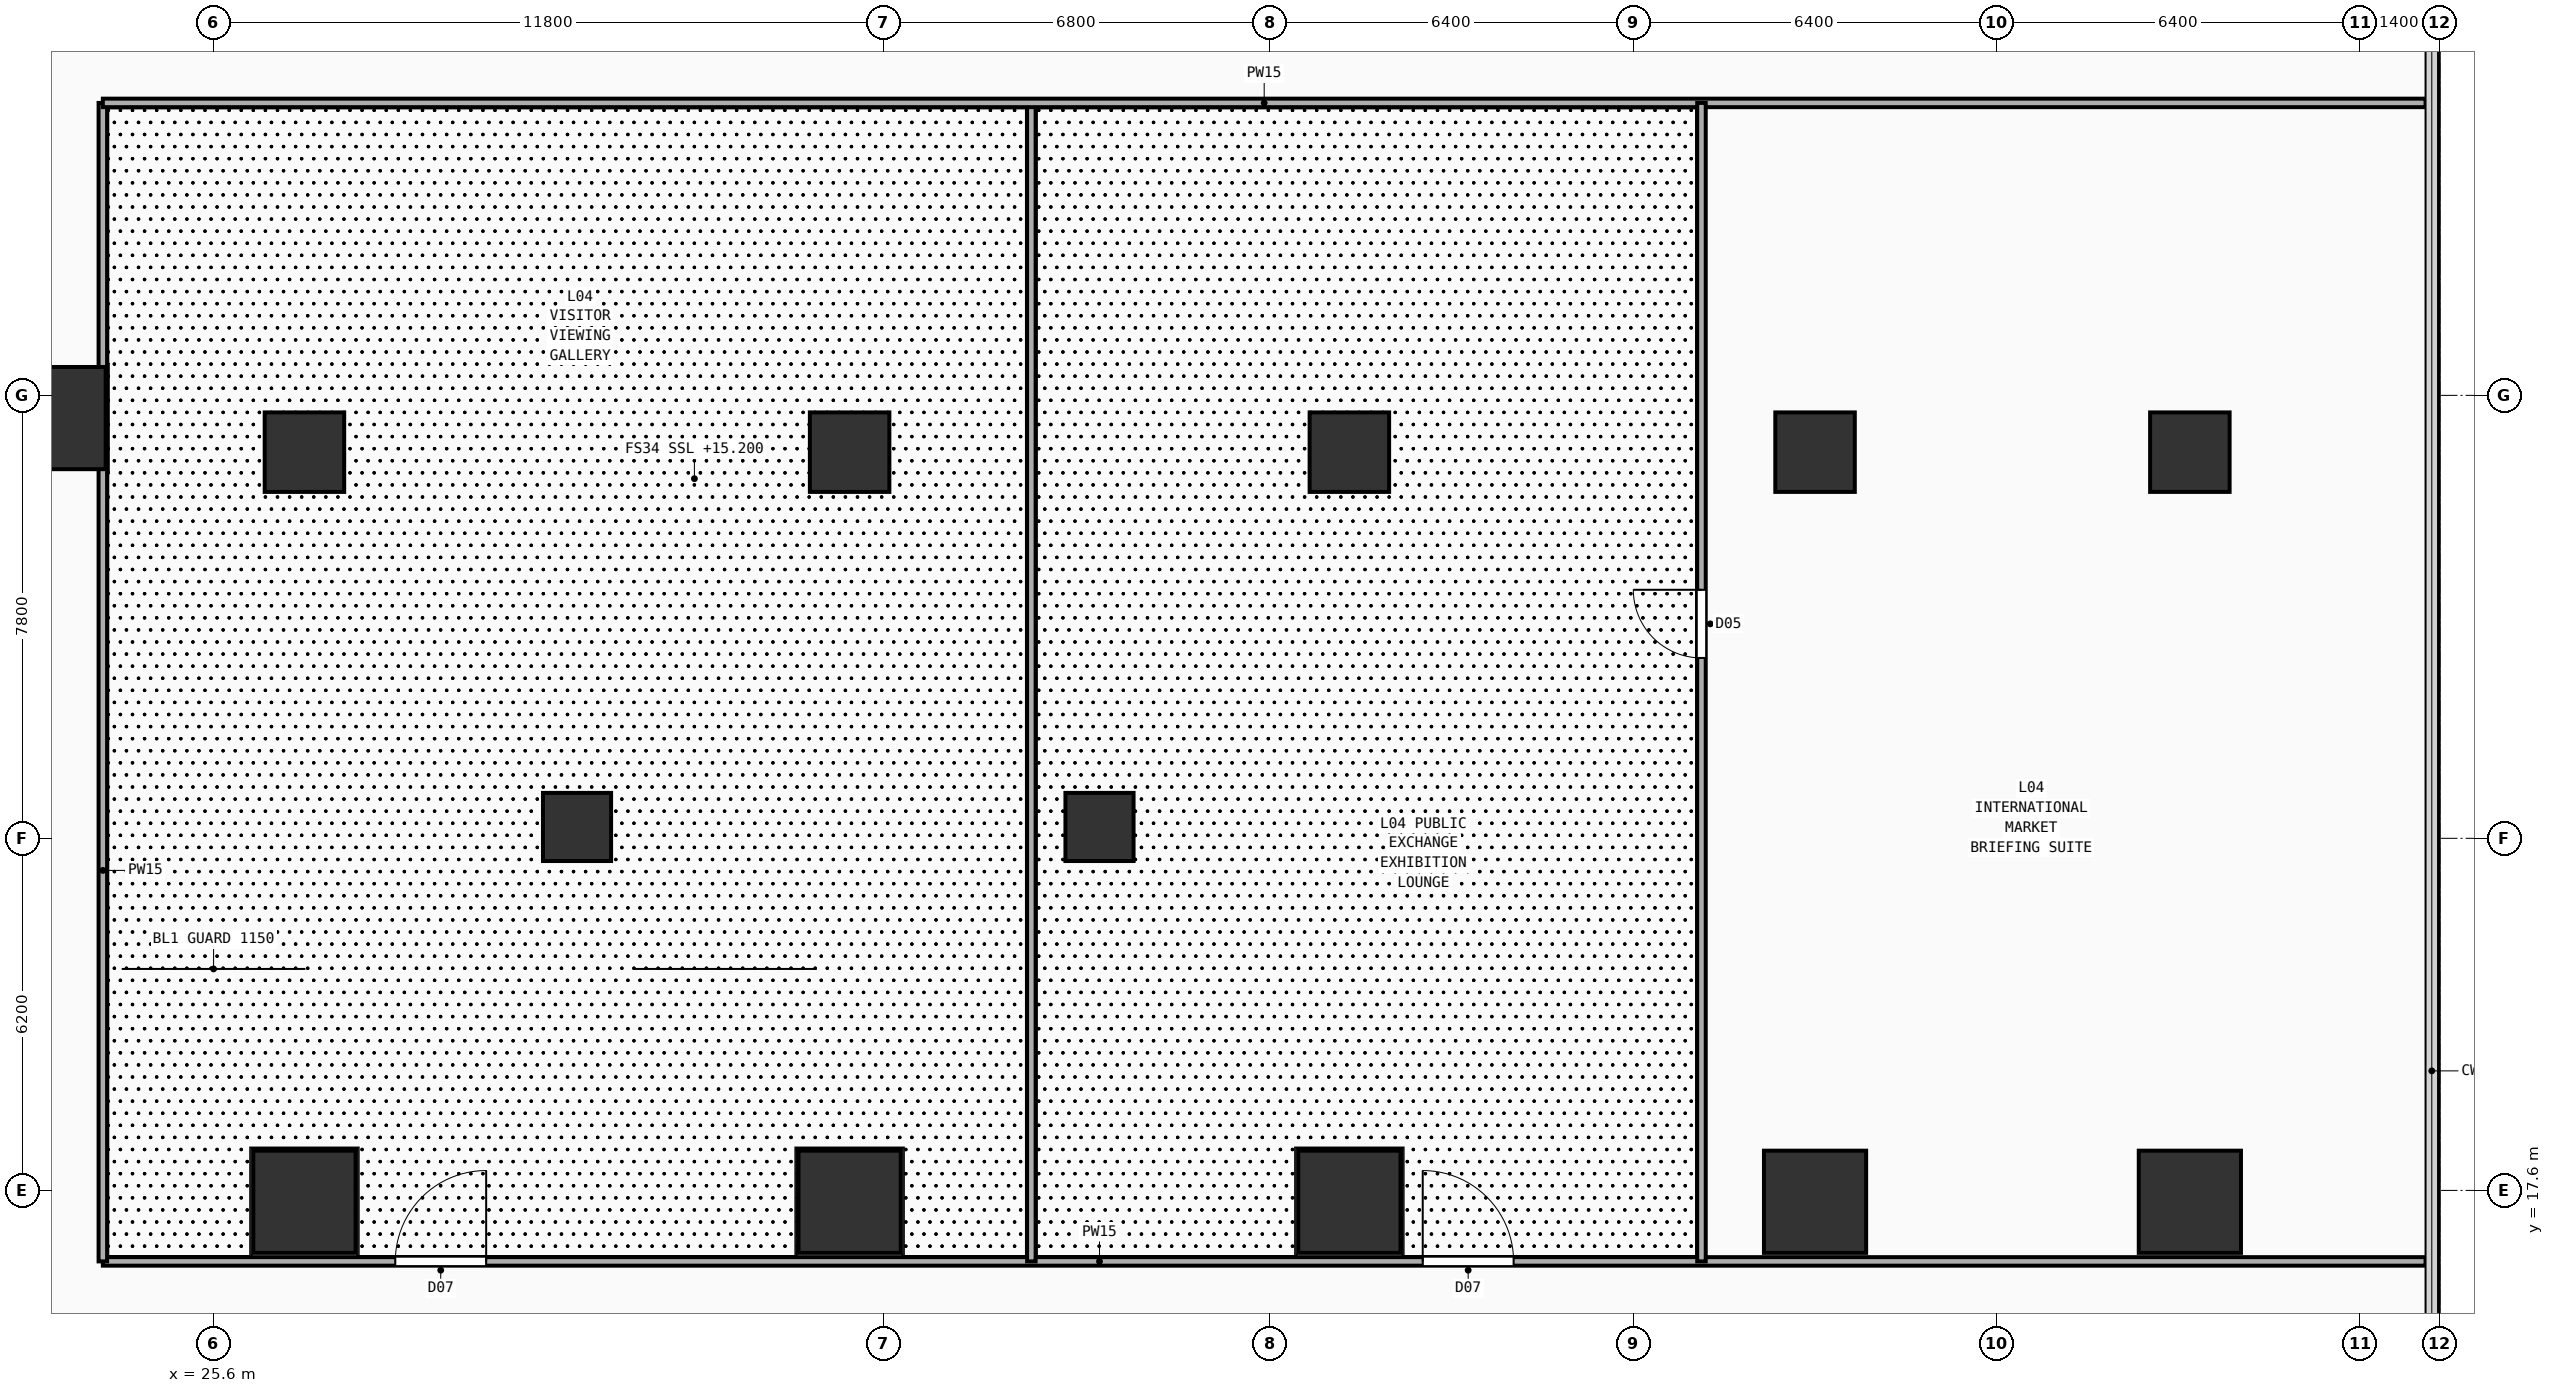
"""IFC4 building model, lengths in metres.
Left out: names, types, materials, properties, quantities, classifications, styles, units other than length and angle.
Written with IfcOpenShell. Run it as: python <this file> out.ifc"""

import sys

from ifc_helpers import new_model, si_unit, direction, frame, frame_2d, origin, origin_2d, place, context, subcontext, project, spatial, rectangle, circle, extrude, element, fill, save


model = new_model("IFC4")
c1 = context("Model", 3, precision=1e-05, world=origin(), true_north=direction((0.0, 1.0)))
c2 = subcontext(c1, "Body", "Model", "MODEL_VIEW")
j1 = project(units=[si_unit("LENGTHUNIT", "METRE"), si_unit("PLANEANGLEUNIT", "RADIAN")], contexts=[c1])
p1 = place(None, origin())
s1 = spatial("IfcSite", under=j1, at=p1, CompositionType="ELEMENT")
p2 = place(p1, origin())
s2 = spatial("IfcBuilding", under=s1, at=p2, CompositionType="ELEMENT")
p3 = place(p2, frame((0.0, 0.0, 15.2)))
s3 = spatial("IfcBuildingStorey", under=s2, at=p3, CompositionType="ELEMENT", Elevation=15.2)
for number, where, z_axis, x_axis in (
    (1, (27.2, 17.4, 0.0), (0.0, 0.0, 1.0), (1.0, 0.0, 0.0)),
    (2, (36.8, 17.4, 0.0), (0.0, 0.0, 1.0), (1.0, 0.0, 0.0)),
    (3, (45.6, 17.4, 0.0), (0.0, 0.0, 1.0), (1.0, 0.0, 0.0)),
    (4, (53.8, 17.4, 0.0), (0.0, 0.0, 1.0), (1.0, 0.0, 0.0)),
    (5, (60.4, 17.4, 0.0), (0.0, 0.0, 1.0), (1.0, 0.0, 0.0)),
    (6, (22.8, 31.2, 0.0), (0.0, 0.0, 1.0), (1.0, 0.0, 0.0)),
):
    element("IfcColumn", number, at=place(p3, frame(where, z_axis=z_axis, x_axis=x_axis)), inside=s3, PredefinedType="COLUMN", context=c2, shape_type="SweptSolid", body=[
        extrude(rectangle(XDim=1.8, YDim=1.8, at=origin_2d()), origin(), (0.0, 0.0, 1.0), 4.46),
    ])
for number, where, z_axis, x_axis in (
    (7, (27.2, 30.6, 0.0), (0.0, 0.0, 1.0), (1.0, 0.0, 0.0)),
    (8, (36.8, 30.6, 0.0), (0.0, 0.0, 1.0), (1.0, 0.0, 0.0)),
    (9, (45.6, 30.6, 0.0), (0.0, 0.0, 1.0), (1.0, 0.0, 0.0)),
    (10, (53.8, 30.6, 0.0), (0.0, 0.0, 1.0), (1.0, 0.0, 0.0)),
    (11, (60.4, 30.6, 0.0), (0.0, 0.0, 1.0), (1.0, 0.0, 0.0)),
):
    element("IfcColumn", number, at=place(p3, frame(where, z_axis=z_axis, x_axis=x_axis)), inside=s3, PredefinedType="COLUMN", context=c2, shape_type="SweptSolid", body=[
        extrude(rectangle(XDim=1.4, YDim=1.4, at=origin_2d()), origin(), (0.0, 0.0, 1.0), 4.46),
    ])
for number, where, z_axis, x_axis in (
    (12, (32.0, 24.0, 0.0), (0.0, 0.0, 1.0), (1.0, 0.0, 0.0)),
    (13, (41.2, 24.0, 0.0), (0.0, 0.0, 1.0), (1.0, 0.0, 0.0)),
):
    element("IfcColumn", number, at=place(p3, frame(where, z_axis=z_axis, x_axis=x_axis)), inside=s3, PredefinedType="COLUMN", context=c2, shape_type="SweptSolid", body=[
        extrude(circle(Radius=0.6, at=origin_2d()), origin(), (0.0, 0.0, 1.0), 4.46),
    ])
p4 = place(p3, frame((23.65, 16.35, 0.0), z_axis=(0.0, 0.0, 1.0), x_axis=(1.0, 0.0, 0.0)))
e14 = element("IfcWall", 14, at=p4, inside=s3, PredefinedType="PARTITIONING", context=c2, shape_type="SweptSolid", body=[
    extrude(rectangle(XDim=40.9, YDim=0.15, at=frame_2d((20.45, 0.0))), origin(), (0.0, 0.0, 1.0), 4.46),
])
p5 = place(p4, frame((5.15, 0.0, 0.0)))
e15 = element("IfcOpeningElement", 15, at=p5, cuts=e14, PredefinedType="OPENING", context=c2, shape_type="SweptSolid", body=[
    extrude(rectangle(XDim=1.6, YDim=2.4, at=frame_2d((0.8, 1.2))), frame((0.0, 0.085, 0.0), z_axis=(0.0, -1.0, 0.0), x_axis=(1.0, 0.0, 0.0)), (0.0, 0.0, 1.0), 0.17),
])
p6 = place(p4, frame((23.242, 0.0, 0.0)))
e16 = element("IfcOpeningElement", 16, at=p6, cuts=e14, PredefinedType="OPENING", context=c2, shape_type="SweptSolid", body=[
    extrude(rectangle(XDim=1.6, YDim=2.4, at=frame_2d((0.8, 1.2))), frame((0.0, 0.085, 0.0), z_axis=(0.0, -1.0, 0.0), x_axis=(1.0, 0.0, 0.0)), (0.0, 0.0, 1.0), 0.17),
])
for number, where, z_axis, x_axis in (
    (17, (23.65, 16.35, 0.0), (0.0, 0.0, 1.0), (0.0, 1.0, 0.0)),
    (18, (40.0, 16.35, 0.0), (0.0, 0.0, 1.0), (0.0, 1.0, 0.0)),
):
    element("IfcWall", number, at=place(p3, frame(where, z_axis=z_axis, x_axis=x_axis)), inside=s3, PredefinedType="PARTITIONING", context=c2, shape_type="SweptSolid", body=[
        extrude(rectangle(XDim=20.4, YDim=0.15, at=frame_2d((10.2, 0.0))), origin(), (0.0, 0.0, 1.0), 4.46),
    ])
p7 = place(p3, frame((23.65, 36.75, 0.0), z_axis=(0.0, 0.0, 1.0), x_axis=(1.0, 0.0, 0.0)))
e19 = element("IfcWall", 19, at=p7, inside=s3, PredefinedType="PARTITIONING", context=c2, shape_type="SweptSolid", body=[
    extrude(rectangle(XDim=40.9, YDim=0.15, at=frame_2d((20.45, 0.0))), origin(), (0.0, 0.0, 1.0), 4.46),
])
p8 = place(p3, frame((51.8, 16.35, 0.0), z_axis=(0.0, 0.0, 1.0), x_axis=(0.0, 1.0, 0.0)))
e20 = element("IfcWall", 20, at=p8, inside=s3, PredefinedType="PARTITIONING", context=c2, shape_type="SweptSolid", body=[
    extrude(rectangle(XDim=20.4, YDim=0.15, at=frame_2d((10.2, 0.0))), origin(), (0.0, 0.0, 1.0), 4.46),
])
p9 = place(p8, frame((10.626, 0.0, 0.0)))
e21 = element("IfcOpeningElement", 21, at=p9, cuts=e20, PredefinedType="OPENING", context=c2, shape_type="SweptSolid", body=[
    extrude(rectangle(XDim=1.2, YDim=2.25, at=frame_2d((0.6, 1.125))), frame((0.0, 0.085, 0.0), z_axis=(0.0, -1.0, 0.0), x_axis=(1.0, 0.0, 0.0)), (0.0, 0.0, 1.0), 0.17),
])
p10 = place(p5, origin())
e22 = element("IfcDoor", 22, at=p10, inside=s3, OperationType="SINGLE_SWING_RIGHT", PredefinedType="DOOR", context=c2, shape_type="SweptSolid", body=[
    extrude(rectangle(XDim=1.6, YDim=2.4, at=frame_2d((0.8, 1.2))), frame((0.0, 0.025, 0.0), z_axis=(0.0, -1.0, 0.0), x_axis=(1.0, 0.0, 0.0)), (0.0, 0.0, 1.0), 0.05),
])
fill(e15, e22)
p11 = place(p6, origin())
e23 = element("IfcDoor", 23, at=p11, inside=s3, OperationType="SINGLE_SWING_LEFT", PredefinedType="DOOR", context=c2, shape_type="SweptSolid", body=[
    extrude(rectangle(XDim=1.6, YDim=2.4, at=frame_2d((0.8, 1.2))), frame((0.0, 0.025, 0.0), z_axis=(0.0, -1.0, 0.0), x_axis=(1.0, 0.0, 0.0)), (0.0, 0.0, 1.0), 0.05),
])
fill(e16, e23)
p12 = place(p9, origin())
e24 = element("IfcDoor", 24, at=p12, inside=s3, OperationType="SINGLE_SWING_RIGHT", PredefinedType="DOOR", context=c2, shape_type="SweptSolid", body=[
    extrude(rectangle(XDim=1.2, YDim=2.25, at=frame_2d((0.6, 1.125))), frame((0.0, 0.025, 0.0), z_axis=(0.0, -1.0, 0.0), x_axis=(1.0, 0.0, 0.0)), (0.0, 0.0, 1.0), 0.05),
])
fill(e21, e24)
save(model, sys.argv[1])
